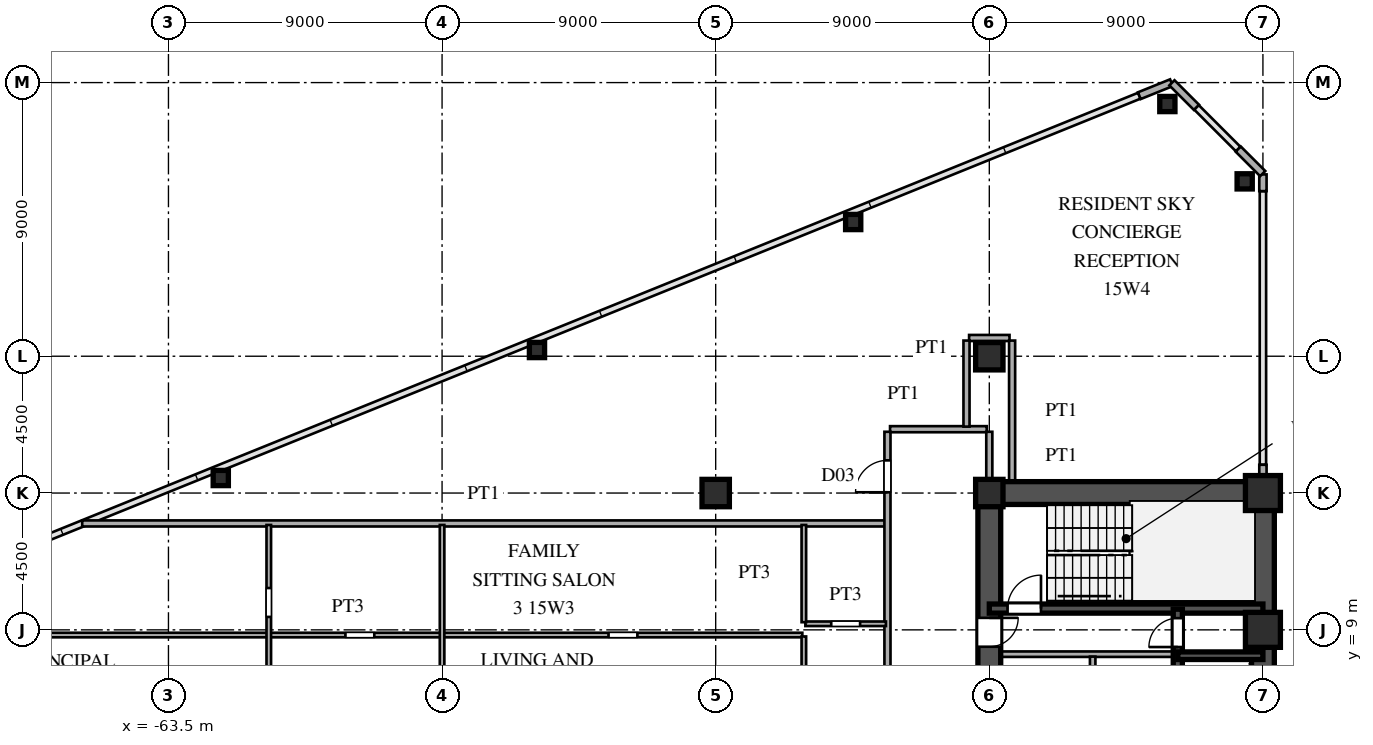
"""IFC4 building model, lengths in metres.
Left out: names, types, materials, properties, quantities, classifications, styles, units other than length and angle.
Written with IfcOpenShell. Run it as: python <this file> out.ifc"""

import sys

from ifc_helpers import new_model, si_unit, direction, frame, frame_2d, origin, origin_2d, place, context, subcontext, project, spatial, rectangle, hollow_rectangle, i_section, extrude, source, transform, mapped, element, fill, save


model = new_model("IFC4")
c1 = context("Model", 3, precision=1e-05, world=origin(), true_north=direction((0.0, 1.0)))
c2 = subcontext(c1, "Body", "Model", "MODEL_VIEW")
j1 = project(units=[si_unit("LENGTHUNIT", "METRE"), si_unit("PLANEANGLEUNIT", "RADIAN")], contexts=[c1])
p1 = place(None, origin())
s1 = spatial("IfcSite", under=j1, at=p1, CompositionType="ELEMENT")
p2 = place(p1, origin())
s2 = spatial("IfcBuilding", under=s1, at=p2, CompositionType="ELEMENT")
p3 = place(p2, frame((0.0, 0.0, 58.5)))
s3 = spatial("IfcBuildingStorey", under=s2, at=p3, CompositionType="ELEMENT", Elevation=58.5)
m1 = source(origin(), c2, "Body", "SweptSolid", [
    extrude(hollow_rectangle(XDim=1.15, YDim=1.15, WallThickness=0.048, at=origin_2d()), origin(), (0.0, 0.0, 1.0), 3.6),
])
for number, where, z_axis, x_axis in (
    (1, (-27.5, 9.0, 0.0), (0.0, 0.0, 1.0), (1.0, 0.0, 0.0)),
    (2, (-27.5, 13.5, 0.0), (0.0, 0.0, 1.0), (1.0, 0.0, 0.0)),
):
    element("IfcColumn", number, at=place(p3, frame(where, z_axis=z_axis, x_axis=x_axis)), inside=s3, PredefinedType="COLUMN", context=c2, shape_type="MappedRepresentation", body=[
        mapped(m1, transform((0.0, 0.0, 0.0), scale=1.0)),
    ])
m2 = source(origin(), c2, "Body", "SweptSolid", [
    extrude(i_section(OverallWidth=0.9, OverallDepth=0.9, WebThickness=0.036, FlangeThickness=0.055, at=origin_2d()), origin(), (0.0, 0.0, 1.0), 3.6),
])
for number, where, z_axis, x_axis in (
    (3, (-36.5, 13.5, 0.0), (0.0, 0.0, 1.0), (1.0, 0.0, 0.0)),
    (4, (-36.5, 18.0, 0.0), (0.0, 0.0, 1.0), (1.0, 0.0, 0.0)),
    (5, (-45.5, 13.5, 0.0), (0.0, 0.0, 1.0), (1.0, 0.0, 0.0)),
):
    element("IfcColumn", number, at=place(p3, frame(where, z_axis=z_axis, x_axis=x_axis)), inside=s3, PredefinedType="COLUMN", context=c2, shape_type="MappedRepresentation", body=[
        mapped(m2, transform((0.0, 0.0, 0.0), scale=1.0)),
    ])
m3 = source(origin(), c2, "Body", "SweptSolid", [
    extrude(hollow_rectangle(XDim=0.5, YDim=0.5, WallThickness=0.02, at=origin_2d()), origin(), (0.0, 0.0, 1.0), 3.6),
])
for number, where, z_axis, x_axis in (
    (6, (-28.1, 23.751, 0.0), (0.0, 0.0, 1.0), (1.0, 0.0, 0.0)),
    (7, (-30.643, 26.295, 0.0), (0.0, 0.0, 1.0), (1.0, 0.0, 0.0)),
    (8, (-40.977, 22.414, 0.0), (0.0, 0.0, 1.0), (1.0, 0.0, 0.0)),
    (9, (-51.378, 18.204, 0.0), (0.0, 0.0, 1.0), (1.0, 0.0, 0.0)),
    (10, (-61.779, 13.994, 0.0), (0.0, 0.0, 1.0), (1.0, 0.0, 0.0)),
):
    element("IfcColumn", number, at=place(p3, frame(where, z_axis=z_axis, x_axis=x_axis)), inside=s3, PredefinedType="COLUMN", context=c2, shape_type="MappedRepresentation", body=[
        mapped(m3, transform((0.0, 0.0, 0.0), scale=1.0)),
    ])
p4 = place(p3, frame((-27.5, 13.88, 0.0), z_axis=(0.0, 0.0, 1.0), x_axis=(0.0, 1.0, 0.0)))
e11 = element("IfcWall", 11, at=p4, inside=s3, PredefinedType="SOLIDWALL", context=c2, shape_type="SweptSolid", body=[
    extrude(rectangle(XDim=0.55, YDim=0.24, at=frame_2d((0.275, 0.0))), origin(), (0.0, 0.0, 1.0), 1.88),
])
p5 = place(p3, frame((-27.5, 23.43, 0.0), z_axis=(0.0, 0.0, 1.0), x_axis=(0.0, 1.0, 0.0)))
e12 = element("IfcWall", 12, at=p5, inside=s3, PredefinedType="SOLIDWALL", context=c2, shape_type="SweptSolid", body=[
    extrude(rectangle(XDim=0.55, YDim=0.24, at=frame_2d((0.275, 0.0))), origin(), (0.0, 0.0, 1.0), 3.38),
])
for number, where, z_axis, x_axis in (
    (13, (-27.507, 24.007, 0.0), (0.0, 0.0, 1.0), (-0.707, 0.707, 0.0)),
    (14, (-29.687, 26.187, 0.0), (0.0, 0.0, 1.0), (-0.707, 0.707, 0.0)),
):
    element("IfcWall", number, at=place(p3, frame(where, z_axis=z_axis, x_axis=x_axis)), inside=s3, PredefinedType="SOLIDWALL", context=c2, shape_type="SweptSolid", body=[
        extrude(rectangle(XDim=1.14, YDim=0.24, at=frame_2d((0.57, 0.0))), origin(), (0.0, 0.0, 1.0), 3.38),
    ])
p6 = place(p3, frame((-30.509, 26.996, 0.0), z_axis=(0.0, 0.0, 1.0), x_axis=(-0.927007103665, -0.375043770452, 0.0)))
e15 = element("IfcWall", 15, at=p6, inside=s3, PredefinedType="SOLIDWALL", context=c2, shape_type="SweptSolid", body=[
    extrude(rectangle(XDim=1.14, YDim=0.24, at=frame_2d((0.57, 0.0))), origin(), (0.0, 0.0, 1.0), 3.38),
])
p7 = place(p3, frame((-27.5, 1.3, 0.0), z_axis=(0.0, 0.0, 1.0), x_axis=(0.0, 1.0, 0.0)))
e16 = element("IfcWall", 16, at=p7, inside=s3, PredefinedType="SHEAR", context=c2, shape_type="SweptSolid", body=[
    extrude(rectangle(XDim=12.2, YDim=0.75, at=frame_2d((6.1, 0.0))), origin(), (0.0, 0.0, 1.0), 3.38),
])
p8 = place(p3, frame((-36.5, 13.5, 0.0), z_axis=(0.0, 0.0, 1.0), x_axis=(1.0, 0.0, 0.0)))
e17 = element("IfcWall", 17, at=p8, inside=s3, PredefinedType="SHEAR", context=c2, shape_type="SweptSolid", body=[
    extrude(rectangle(XDim=9.0, YDim=0.75, at=frame_2d((4.5, 0.0))), origin(), (0.0, 0.0, 1.0), 3.38),
])
p9 = place(p3, frame((-36.5, 8.2, 0.0), z_axis=(0.0, 0.0, 1.0), x_axis=(0.0, 1.0, 0.0)))
e18 = element("IfcWall", 18, at=p9, inside=s3, PredefinedType="SHEAR", context=c2, shape_type="SweptSolid", body=[
    extrude(rectangle(XDim=5.45, YDim=0.75, at=frame_2d((2.725, 0.0))), origin(), (0.0, 0.0, 1.0), 3.38),
])
p10 = place(p9, frame((0.245, 0.0, 0.0)))
e19 = element("IfcOpeningElement", 19, at=p10, cuts=e18, PredefinedType="OPENING", context=c2, shape_type="SweptSolid", body=[
    extrude(rectangle(XDim=0.95, YDim=2.15, at=frame_2d((0.475, 1.075))), frame((0.0, 0.385, 0.0), z_axis=(0.0, -1.0, 0.0), x_axis=(1.0, 0.0, 0.0)), (0.0, 0.0, 1.0), 0.77),
])
p11 = place(p3, frame((-36.5, 5.9, 0.0), z_axis=(0.0, 0.0, 1.0), x_axis=(0.0, 1.0, 0.0)))
e20 = element("IfcWall", 20, at=p11, inside=s3, PredefinedType="SHEAR", context=c2, shape_type="SweptSolid", body=[
    extrude(rectangle(XDim=2.3, YDim=0.75, at=frame_2d((1.15, 0.0))), origin(), (0.0, 0.0, 1.0), 3.38),
])
p12 = place(p11, frame((0.675, 0.0, 0.0)))
e21 = element("IfcOpeningElement", 21, at=p12, cuts=e20, PredefinedType="OPENING", context=c2, shape_type="SweptSolid", body=[
    extrude(rectangle(XDim=0.95, YDim=2.15, at=frame_2d((0.475, 1.075))), frame((0.0, 0.385, 0.0), z_axis=(0.0, -1.0, 0.0), x_axis=(1.0, 0.0, 0.0)), (0.0, 0.0, 1.0), 0.77),
])
p13 = place(p3, frame((-36.5, 9.7, 0.0), z_axis=(0.0, 0.0, 1.0), x_axis=(1.0, 0.0, 0.0)))
e22 = element("IfcWall", 22, at=p13, inside=s3, PredefinedType="SHEAR", context=c2, shape_type="SweptSolid", body=[
    extrude(rectangle(XDim=9.0, YDim=0.3, at=frame_2d((4.5, 0.0))), origin(), (0.0, 0.0, 1.0), 3.38),
])
p14 = place(p13, frame((0.6, 0.0, 0.0)))
e23 = element("IfcOpeningElement", 23, at=p14, cuts=e22, PredefinedType="OPENING", context=c2, shape_type="SweptSolid", body=[
    extrude(rectangle(XDim=1.1, YDim=2.2, at=frame_2d((0.55, 1.1))), frame((0.0, 0.16, 0.0), z_axis=(0.0, -1.0, 0.0), x_axis=(1.0, 0.0, 0.0)), (0.0, 0.0, 1.0), 0.32),
])
p15 = place(p3, frame((-30.3, 8.15, 0.0), z_axis=(0.0, 0.0, 1.0), x_axis=(1.0, 0.0, 0.0)))
e24 = element("IfcWall", 24, at=p15, inside=s3, PredefinedType="SHEAR", context=c2, shape_type="SweptSolid", body=[
    extrude(rectangle(XDim=2.8, YDim=0.25, at=frame_2d((1.4, 0.0))), origin(), (0.0, 0.0, 1.0), 3.38),
])
p16 = place(p3, frame((-30.3, 5.9, 0.0), z_axis=(0.0, 0.0, 1.0), x_axis=(0.0, 1.0, 0.0)))
e25 = element("IfcWall", 25, at=p16, inside=s3, PredefinedType="SHEAR", context=c2, shape_type="SweptSolid", body=[
    extrude(rectangle(XDim=2.25, YDim=0.3, at=frame_2d((1.125, 0.0))), origin(), (0.0, 0.0, 1.0), 3.38),
])
p17 = place(p3, frame((-30.3, 8.15, 0.0), z_axis=(0.0, 0.0, 1.0), x_axis=(0.0, 1.0, 0.0)))
e26 = element("IfcWall", 26, at=p17, inside=s3, PredefinedType="SHEAR", context=c2, shape_type="SweptSolid", body=[
    extrude(rectangle(XDim=1.53, YDim=0.3, at=frame_2d((0.765, 0.0))), origin(), (0.0, 0.0, 1.0), 3.38),
])
p18 = place(p17, frame((0.285, 0.0, 0.0)))
e27 = element("IfcOpeningElement", 27, at=p18, cuts=e26, PredefinedType="OPENING", context=c2, shape_type="SweptSolid", body=[
    extrude(rectangle(XDim=0.95, YDim=2.15, at=frame_2d((0.475, 1.075))), frame((0.0, 0.16, 0.0), z_axis=(0.0, -1.0, 0.0), x_axis=(1.0, 0.0, 0.0)), (0.0, 0.0, 1.0), 0.32),
])
p19 = place(p3, frame((-36.15, 8.2, 0.0), z_axis=(0.0, 0.0, 1.0), x_axis=(1.0, 0.0, 0.0)))
e28 = element("IfcWall", 28, at=p19, inside=s3, PredefinedType="PARTITIONING", context=c2, shape_type="SweptSolid", body=[
    extrude(rectangle(XDim=5.7, YDim=0.18, at=frame_2d((2.85, 0.0))), origin(), (0.0, 0.0, 1.0), 3.38),
])
p20 = place(p3, frame((-33.1, 1.38, 0.0), z_axis=(0.0, 0.0, 1.0), x_axis=(0.0, 1.0, 0.0)))
e29 = element("IfcWall", 29, at=p20, inside=s3, PredefinedType="PARTITIONING", context=c2, shape_type="SweptSolid", body=[
    extrude(rectangle(XDim=6.74, YDim=0.18, at=frame_2d((3.37, 0.0))), origin(), (0.0, 0.0, 1.0), 3.38),
])
p21 = place(p3, frame((-72.535, 8.83, 0.0), z_axis=(0.0, 0.0, 1.0), x_axis=(1.0, 0.0, 0.0)))
e30 = element("IfcWall", 30, at=p21, inside=s3, PredefinedType="PARTITIONING", context=c2, shape_type="SweptSolid", body=[
    extrude(rectangle(XDim=29.885, YDim=0.15, at=frame_2d((14.942, 0.0))), origin(), (0.0, 0.0, 1.0), 3.38),
])
p22 = place(p21, frame((23.51, 0.0, 0.0)))
e31 = element("IfcOpeningElement", 31, at=p22, cuts=e30, PredefinedType="OPENING", context=c2, shape_type="SweptSolid", body=[
    extrude(rectangle(XDim=0.95, YDim=2.15, at=frame_2d((0.475, 1.075))), frame((0.0, 0.085, 0.0), z_axis=(0.0, -1.0, 0.0), x_axis=(1.0, 0.0, 0.0)), (0.0, 0.0, 1.0), 0.17),
])
p23 = place(p21, frame((14.856, 0.0, 0.0)))
e32 = element("IfcOpeningElement", 32, at=p23, cuts=e30, PredefinedType="OPENING", context=c2, shape_type="SweptSolid", body=[
    extrude(rectangle(XDim=0.95, YDim=2.15, at=frame_2d((0.475, 1.075))), frame((0.0, 0.085, 0.0), z_axis=(0.0, -1.0, 0.0), x_axis=(1.0, 0.0, 0.0)), (0.0, 0.0, 1.0), 0.17),
])
p24 = place(p3, frame((-42.55, 9.2, 0.0), z_axis=(0.0, 0.0, 1.0), x_axis=(1.0, 0.0, 0.0)))
e33 = element("IfcWall", 33, at=p24, inside=s3, PredefinedType="PARTITIONING", context=c2, shape_type="SweptSolid", body=[
    extrude(rectangle(XDim=2.65, YDim=0.15, at=frame_2d((1.325, 0.0))), origin(), (0.0, 0.0, 1.0), 3.38),
])
p25 = place(p24, frame((0.85, 0.0, 0.0)))
e34 = element("IfcOpeningElement", 34, at=p25, cuts=e33, PredefinedType="OPENING", context=c2, shape_type="SweptSolid", body=[
    extrude(rectangle(XDim=0.95, YDim=2.15, at=frame_2d((0.475, 1.075))), frame((0.0, 0.085, 0.0), z_axis=(0.0, -1.0, 0.0), x_axis=(1.0, 0.0, 0.0)), (0.0, 0.0, 1.0), 0.17),
])
p26 = place(p3, frame((-66.337, 12.5, 0.0), z_axis=(0.0, 0.0, 1.0), x_axis=(1.0, 0.0, 0.0)))
e35 = element("IfcWall", 35, at=p26, inside=s3, PredefinedType="PARTITIONING", context=c2, shape_type="SweptSolid", body=[
    extrude(rectangle(XDim=26.407, YDim=0.2, at=frame_2d((13.204, 0.0))), origin(), (0.0, 0.0, 1.0), 3.38),
])
p27 = place(p3, frame((-39.765, 15.6, 0.0), z_axis=(0.0, 0.0, 1.0), x_axis=(1.0, 0.0, 0.0)))
e36 = element("IfcWall", 36, at=p27, inside=s3, PredefinedType="PARTITIONING", context=c2, shape_type="SweptSolid", body=[
    extrude(rectangle(XDim=3.18, YDim=0.2, at=frame_2d((1.59, 0.0))), origin(), (0.0, 0.0, 1.0), 3.38),
])
p28 = place(p3, frame((-37.165, 18.6, 0.0), z_axis=(0.0, 0.0, 1.0), x_axis=(1.0, 0.0, 0.0)))
e37 = element("IfcWall", 37, at=p28, inside=s3, PredefinedType="PARTITIONING", context=c2, shape_type="SweptSolid", body=[
    extrude(rectangle(XDim=1.33, YDim=0.2, at=frame_2d((0.665, 0.0))), origin(), (0.0, 0.0, 1.0), 3.38),
])
p29 = place(p3, frame((-60.2, -12.45, 0.0), z_axis=(0.0, 0.0, 1.0), x_axis=(0.0, 1.0, 0.0)))
e38 = element("IfcWall", 38, at=p29, inside=s3, PredefinedType="PARTITIONING", context=c2, shape_type="SweptSolid", body=[
    extrude(rectangle(XDim=24.9, YDim=0.15, at=frame_2d((12.45, 0.0))), origin(), (0.0, 0.0, 1.0), 3.38),
])
p30 = place(p29, frame((2.049, 0.0, 0.0)))
e39 = element("IfcOpeningElement", 39, at=p30, cuts=e38, PredefinedType="OPENING", context=c2, shape_type="SweptSolid", body=[
    extrude(rectangle(XDim=0.95, YDim=2.15, at=frame_2d((0.475, 1.075))), frame((0.0, 0.085, 0.0), z_axis=(0.0, -1.0, 0.0), x_axis=(1.0, 0.0, 0.0)), (0.0, 0.0, 1.0), 0.17),
])
p31 = place(p29, frame((6.475, 0.0, 0.0)))
e40 = element("IfcOpeningElement", 40, at=p31, cuts=e38, PredefinedType="OPENING", context=c2, shape_type="SweptSolid", body=[
    extrude(rectangle(XDim=0.95, YDim=2.15, at=frame_2d((0.475, 1.075))), frame((0.0, 0.085, 0.0), z_axis=(0.0, -1.0, 0.0), x_axis=(1.0, 0.0, 0.0)), (0.0, 0.0, 1.0), 0.17),
])
p32 = place(p29, frame((11.142, 0.0, 0.0)))
e41 = element("IfcOpeningElement", 41, at=p32, cuts=e38, PredefinedType="OPENING", context=c2, shape_type="SweptSolid", body=[
    extrude(rectangle(XDim=0.95, YDim=2.15, at=frame_2d((0.475, 1.075))), frame((0.0, 0.085, 0.0), z_axis=(0.0, -1.0, 0.0), x_axis=(1.0, 0.0, 0.0)), (0.0, 0.0, 1.0), 0.17),
])
p33 = place(p29, frame((15.308, 0.0, 0.0)))
e42 = element("IfcOpeningElement", 42, at=p33, cuts=e38, PredefinedType="OPENING", context=c2, shape_type="SweptSolid", body=[
    extrude(rectangle(XDim=0.95, YDim=2.15, at=frame_2d((0.475, 1.075))), frame((0.0, 0.085, 0.0), z_axis=(0.0, -1.0, 0.0), x_axis=(1.0, 0.0, 0.0)), (0.0, 0.0, 1.0), 0.17),
])
p34 = place(p29, frame((18.975, 0.0, 0.0)))
e43 = element("IfcOpeningElement", 43, at=p34, cuts=e38, PredefinedType="OPENING", context=c2, shape_type="SweptSolid", body=[
    extrude(rectangle(XDim=0.95, YDim=2.15, at=frame_2d((0.475, 1.075))), frame((0.0, 0.085, 0.0), z_axis=(0.0, -1.0, 0.0), x_axis=(1.0, 0.0, 0.0)), (0.0, 0.0, 1.0), 0.17),
])
p35 = place(p29, frame((21.875, 0.0, 0.0)))
e44 = element("IfcOpeningElement", 44, at=p35, cuts=e38, PredefinedType="OPENING", context=c2, shape_type="SweptSolid", body=[
    extrude(rectangle(XDim=0.95, YDim=2.15, at=frame_2d((0.475, 1.075))), frame((0.0, 0.085, 0.0), z_axis=(0.0, -1.0, 0.0), x_axis=(1.0, 0.0, 0.0)), (0.0, 0.0, 1.0), 0.17),
])
p36 = place(p3, frame((-54.5, -17.236, 0.0), z_axis=(0.0, 0.0, 1.0), x_axis=(0.0, 1.0, 0.0)))
e45 = element("IfcWall", 45, at=p36, inside=s3, PredefinedType="PARTITIONING", context=c2, shape_type="SweptSolid", body=[
    extrude(rectangle(XDim=29.686, YDim=0.15, at=frame_2d((14.843, 0.0))), origin(), (0.0, 0.0, 1.0), 2.68),
])
p37 = place(p36, frame((1.868, 0.0, 0.0)))
e46 = element("IfcOpeningElement", 46, at=p37, cuts=e45, PredefinedType="OPENING", context=c2, shape_type="SweptSolid", body=[
    extrude(rectangle(XDim=0.95, YDim=2.15, at=frame_2d((0.475, 1.075))), frame((0.0, 0.085, 0.0), z_axis=(0.0, -1.0, 0.0), x_axis=(1.0, 0.0, 0.0)), (0.0, 0.0, 1.0), 0.17),
])
p38 = place(p36, frame((11.188, 0.0, 0.0)))
e47 = element("IfcOpeningElement", 47, at=p38, cuts=e45, PredefinedType="OPENING", context=c2, shape_type="SweptSolid", body=[
    extrude(rectangle(XDim=0.95, YDim=2.15, at=frame_2d((0.475, 1.075))), frame((0.0, 0.085, 0.0), z_axis=(0.0, -1.0, 0.0), x_axis=(1.0, 0.0, 0.0)), (0.0, 0.0, 1.0), 0.17),
])
p39 = place(p36, frame((23.761, 0.0, 0.0)))
e48 = element("IfcOpeningElement", 48, at=p39, cuts=e45, PredefinedType="OPENING", context=c2, shape_type="SweptSolid", body=[
    extrude(rectangle(XDim=0.95, YDim=2.15, at=frame_2d((0.475, 1.075))), frame((0.0, 0.085, 0.0), z_axis=(0.0, -1.0, 0.0), x_axis=(1.0, 0.0, 0.0)), (0.0, 0.0, 1.0), 0.17),
])
p40 = place(p3, frame((-42.6, 5.217, 0.0), z_axis=(0.0, 0.0, 1.0), x_axis=(0.0, 1.0, 0.0)))
e49 = element("IfcWall", 49, at=p40, inside=s3, PredefinedType="PARTITIONING", context=c2, shape_type="SweptSolid", body=[
    extrude(rectangle(XDim=3.566, YDim=0.15, at=frame_2d((1.783, 0.0))), origin(), (0.0, 0.0, 1.0), 3.38),
])
p41 = place(p40, frame((1.308, 0.0, 0.0)))
e50 = element("IfcOpeningElement", 50, at=p41, cuts=e49, PredefinedType="OPENING", context=c2, shape_type="SweptSolid", body=[
    extrude(rectangle(XDim=0.95, YDim=2.15, at=frame_2d((0.475, 1.075))), frame((0.0, 0.085, 0.0), z_axis=(0.0, -1.0, 0.0), x_axis=(1.0, 0.0, 0.0)), (0.0, 0.0, 1.0), 0.17),
])
p42 = place(p3, frame((-42.6, 9.252, 0.0), z_axis=(0.0, 0.0, 1.0), x_axis=(0.0, 1.0, 0.0)))
e51 = element("IfcWall", 51, at=p42, inside=s3, PredefinedType="PARTITIONING", context=c2, shape_type="SweptSolid", body=[
    extrude(rectangle(XDim=3.198, YDim=0.15, at=frame_2d((1.599, 0.0))), origin(), (0.0, 0.0, 1.0), 3.38),
])
p43 = place(p3, frame((-39.85, -15.515, 0.0), z_axis=(0.0, 0.0, 1.0), x_axis=(0.0, 1.0, 0.0)))
e52 = element("IfcWall", 52, at=p43, inside=s3, PredefinedType="PARTITIONING", context=c2, shape_type="SweptSolid", body=[
    extrude(rectangle(XDim=31.03, YDim=0.2, at=frame_2d((15.515, 0.0))), origin(), (0.0, 0.0, 1.0), 3.38),
])
p44 = place(p43, frame((0.94, 0.0, 0.0)))
e53 = element("IfcOpeningElement", 53, at=p44, cuts=e52, PredefinedType="OPENING", context=c2, shape_type="SweptSolid", body=[
    extrude(rectangle(XDim=1.05, YDim=2.25, at=frame_2d((0.525, 1.125))), frame((0.0, 0.11, 0.0), z_axis=(0.0, -1.0, 0.0), x_axis=(1.0, 0.0, 0.0)), (0.0, 0.0, 1.0), 0.22),
])
p45 = place(p43, frame((9.28, 0.0, 0.0)))
e54 = element("IfcOpeningElement", 54, at=p45, cuts=e52, PredefinedType="OPENING", context=c2, shape_type="SweptSolid", body=[
    extrude(rectangle(XDim=1.05, YDim=2.25, at=frame_2d((0.525, 1.125))), frame((0.0, 0.11, 0.0), z_axis=(0.0, -1.0, 0.0), x_axis=(1.0, 0.0, 0.0)), (0.0, 0.0, 1.0), 0.22),
])
p46 = place(p43, frame((21.825, 0.0, 0.0)))
e55 = element("IfcOpeningElement", 55, at=p46, cuts=e52, PredefinedType="OPENING", context=c2, shape_type="SweptSolid", body=[
    extrude(rectangle(XDim=1.05, YDim=2.25, at=frame_2d((0.525, 1.125))), frame((0.0, 0.11, 0.0), z_axis=(0.0, -1.0, 0.0), x_axis=(1.0, 0.0, 0.0)), (0.0, 0.0, 1.0), 0.22),
])
p47 = place(p43, frame((29.04, 0.0, 0.0)))
e56 = element("IfcOpeningElement", 56, at=p47, cuts=e52, PredefinedType="OPENING", context=c2, shape_type="SweptSolid", body=[
    extrude(rectangle(XDim=1.05, YDim=2.25, at=frame_2d((0.525, 1.125))), frame((0.0, 0.11, 0.0), z_axis=(0.0, -1.0, 0.0), x_axis=(1.0, 0.0, 0.0)), (0.0, 0.0, 1.0), 0.22),
])
p48 = place(p3, frame((-37.25, 15.685, 0.0), z_axis=(0.0, 0.0, 1.0), x_axis=(0.0, 1.0, 0.0)))
e57 = element("IfcWall", 57, at=p48, inside=s3, PredefinedType="PARTITIONING", context=c2, shape_type="SweptSolid", body=[
    extrude(rectangle(XDim=2.83, YDim=0.2, at=frame_2d((1.415, 0.0))), origin(), (0.0, 0.0, 1.0), 3.38),
])
p49 = place(p3, frame((-36.5, 13.88, 0.0), z_axis=(0.0, 0.0, 1.0), x_axis=(0.0, 1.0, 0.0)))
e58 = element("IfcWall", 58, at=p49, inside=s3, PredefinedType="PARTITIONING", context=c2, shape_type="SweptSolid", body=[
    extrude(rectangle(XDim=1.635, YDim=0.2, at=frame_2d((0.817, 0.0))), origin(), (0.0, 0.0, 1.0), 1.38),
])
p50 = place(p3, frame((-35.75, 13.88, 0.0), z_axis=(0.0, 0.0, 1.0), x_axis=(0.0, 1.0, 0.0)))
e59 = element("IfcWall", 59, at=p50, inside=s3, PredefinedType="PARTITIONING", context=c2, shape_type="SweptSolid", body=[
    extrude(rectangle(XDim=4.635, YDim=0.2, at=frame_2d((2.317, 0.0))), origin(), (0.0, 0.0, 1.0), 3.38),
])
m4 = source(origin(), c2, "Body", "SweptSolid", [
    extrude(rectangle(XDim=0.95, YDim=2.15, at=frame_2d((0.475, 1.075))), frame((0.0, 0.025, 0.0), z_axis=(0.0, -1.0, 0.0), x_axis=(1.0, 0.0, 0.0)), (0.0, 0.0, 1.0), 0.05),
])
p51 = place(p10, frame((0.95, 0.0, 0.0), z_axis=(0.0, 0.0, 1.0), x_axis=(-1.0, 0.0, 0.0)))
e60 = element("IfcDoor", 60, at=p51, inside=s3, OperationType="SINGLE_SWING_RIGHT", PredefinedType="DOOR", context=c2, shape_type="MappedRepresentation", body=[
    mapped(m4, transform((0.0, 0.0, 0.0), scale=1.0)),
])
fill(e19, e60)
m5 = source(origin(), c2, "Body", "SweptSolid", [
    extrude(rectangle(XDim=1.1, YDim=2.2, at=frame_2d((0.55, 1.1))), frame((0.0, 0.025, 0.0), z_axis=(0.0, -1.0, 0.0), x_axis=(1.0, 0.0, 0.0)), (0.0, 0.0, 1.0), 0.05),
])
p52 = place(p14, origin())
e61 = element("IfcDoor", 61, at=p52, inside=s3, OperationType="SINGLE_SWING_RIGHT", PredefinedType="DOOR", context=c2, shape_type="MappedRepresentation", body=[
    mapped(m5, transform((0.0, 0.0, 0.0), scale=1.0)),
])
fill(e23, e61)
p53 = place(p18, origin())
e62 = element("IfcDoor", 62, at=p53, inside=s3, OperationType="SINGLE_SWING_LEFT", PredefinedType="DOOR", context=c2, shape_type="MappedRepresentation", body=[
    mapped(m4, transform((0.0, 0.0, 0.0), scale=1.0)),
])
fill(e27, e62)
m6 = source(origin(), c2, "Body", "SweptSolid", [
    extrude(rectangle(XDim=1.05, YDim=2.25, at=frame_2d((0.525, 1.125))), frame((0.0, 0.025, 0.0), z_axis=(0.0, -1.0, 0.0), x_axis=(1.0, 0.0, 0.0)), (0.0, 0.0, 1.0), 0.05),
])
p54 = place(p47, origin())
e63 = element("IfcDoor", 63, at=p54, inside=s3, OperationType="SINGLE_SWING_LEFT", PredefinedType="DOOR", context=c2, shape_type="MappedRepresentation", body=[
    mapped(m6, transform((0.0, 0.0, 0.0), scale=1.0)),
])
fill(e56, e63)
save(model, sys.argv[1])
